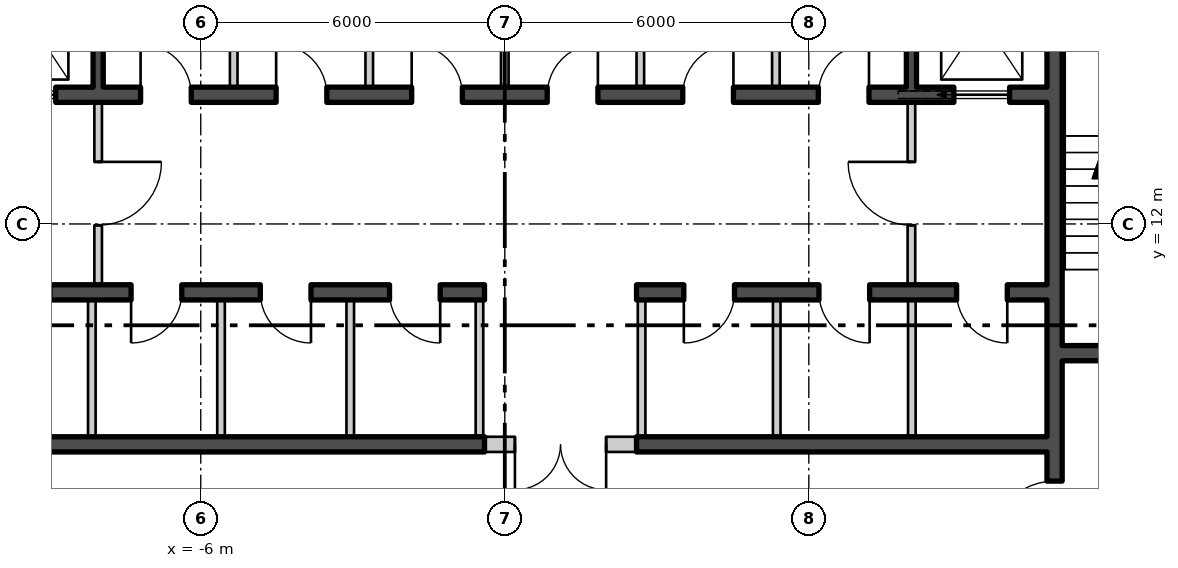
"""IFC4 building model, lengths in metres.
Left out: names, types, materials, properties, quantities, classifications, styles, units other than length and angle.
Written with IfcOpenShell. Run it as: python <this file> out.ifc"""

import sys

from ifc_helpers import new_model, si_unit, direction, frame, frame_2d, origin, place, context, subcontext, project, spatial, rectangle, extrude, element, fill, save


model = new_model("IFC4")
c1 = context("Model", 3, precision=1e-05, world=origin(), true_north=direction((0.0, 1.0)))
c2 = subcontext(c1, "Body", "Model", "MODEL_VIEW")
j1 = project(units=[si_unit("LENGTHUNIT", "METRE"), si_unit("PLANEANGLEUNIT", "RADIAN")], contexts=[c1])
p1 = place(None, origin())
s1 = spatial("IfcSite", under=j1, at=p1, CompositionType="ELEMENT")
p2 = place(p1, origin())
s2 = spatial("IfcBuilding", under=s1, at=p2, CompositionType="ELEMENT")
p3 = place(p2, frame((0.0, 0.0, -16.8)))
s3 = spatial("IfcBuildingStorey", under=s2, at=p3, CompositionType="ELEMENT", Elevation=-16.8)
p4 = place(p3, frame((10.85, 0.6, 0.0), z_axis=(0.0, 0.0, 1.0), x_axis=(0.0, 1.0, 0.0)))
e1 = element("IfcWall", 1, at=p4, inside=s3, PredefinedType="SHEAR", context=c2, shape_type="SweptSolid", body=[
    extrude(rectangle(XDim=16.8, YDim=0.3, at=frame_2d((8.4, 0.0))), origin(), (0.0, 0.0, 1.0), 4.95),
])
p5 = place(p4, frame((5.075, 0.0, 0.0)))
e2 = element("IfcOpeningElement", 2, at=p5, cuts=e1, PredefinedType="OPENING", context=c2, shape_type="SweptSolid", body=[
    extrude(rectangle(XDim=1.25, YDim=2.1, at=frame_2d((0.625, 1.05))), frame((0.0, 0.16, 0.0), z_axis=(0.0, -1.0, 0.0), x_axis=(1.0, 0.0, 0.0)), (0.0, 0.0, 1.0), 0.32),
])
p6 = place(p4, frame((1.525, 0.0, 0.0)))
e3 = element("IfcOpeningElement", 3, at=p6, cuts=e1, PredefinedType="OPENING", context=c2, shape_type="SweptSolid", body=[
    extrude(rectangle(XDim=1.0, YDim=2.1, at=frame_2d((0.5, 1.05))), frame((0.0, 0.16, 0.0), z_axis=(0.0, -1.0, 0.0), x_axis=(1.0, 0.0, 0.0)), (0.0, 0.0, 1.0), 0.32),
])
p7 = place(p3, frame((11.0, 9.45, 0.0), z_axis=(0.0, 0.0, 1.0), x_axis=(1.0, 0.0, 0.0)))
e4 = element("IfcWall", 4, at=p7, inside=s3, PredefinedType="SHEAR", context=c2, shape_type="SweptSolid", body=[
    extrude(rectangle(XDim=3.2, YDim=0.3, at=frame_2d((1.6, 0.0))), origin(), (0.0, 0.0, 1.0), 4.95),
])
p8 = place(p7, frame((1.0, 0.0, 0.0)))
e5 = element("IfcOpeningElement", 5, at=p8, cuts=e4, PredefinedType="OPENING", context=c2, shape_type="SweptSolid", body=[
    extrude(rectangle(XDim=1.2, YDim=2.1, at=frame_2d((0.6, 1.05))), frame((0.0, 0.16, 0.0), z_axis=(0.0, -1.0, 0.0), x_axis=(1.0, 0.0, 0.0)), (0.0, 0.0, 1.0), 0.32),
])
p9 = place(p3, frame((-10.7, 14.55, 0.0), z_axis=(0.0, 0.0, 1.0), x_axis=(1.0, 0.0, 0.0)))
e6 = element("IfcWall", 6, at=p9, inside=s3, PredefinedType="SHEAR", context=c2, shape_type="SweptSolid", body=[
    extrude(rectangle(XDim=21.4, YDim=0.3, at=frame_2d((10.7, 0.0))), origin(), (0.0, 0.0, 1.0), 4.95),
])
p10 = place(p9, frame((0.738, 0.0, 0.0)))
e7 = element("IfcOpeningElement", 7, at=p10, cuts=e6, PredefinedType="OPENING", context=c2, shape_type="SweptSolid", body=[
    extrude(rectangle(XDim=1.1, YDim=2.1, at=frame_2d((0.55, 1.05))), frame((0.0, 0.16, 0.0), z_axis=(0.0, -1.0, 0.0), x_axis=(1.0, 0.0, 0.0)), (0.0, 0.0, 1.0), 0.32),
])
p11 = place(p9, frame((19.562, 0.0, 0.0)))
e8 = element("IfcOpeningElement", 8, at=p11, cuts=e6, PredefinedType="OPENING", context=c2, shape_type="SweptSolid", body=[
    extrude(rectangle(XDim=1.1, YDim=2.1, at=frame_2d((0.55, 1.05))), frame((0.0, 0.16, 0.0), z_axis=(0.0, -1.0, 0.0), x_axis=(1.0, 0.0, 0.0)), (0.0, 0.0, 1.0), 0.32),
])
p12 = place(p9, frame((3.513, 0.0, 0.0)))
e9 = element("IfcOpeningElement", 9, at=p12, cuts=e6, PredefinedType="OPENING", context=c2, shape_type="SweptSolid", body=[
    extrude(rectangle(XDim=1.0, YDim=2.1, at=frame_2d((0.5, 1.05))), frame((0.0, 0.16, 0.0), z_axis=(0.0, -1.0, 0.0), x_axis=(1.0, 0.0, 0.0)), (0.0, 0.0, 1.0), 0.32),
])
p13 = place(p9, frame((6.188, 0.0, 0.0)))
e10 = element("IfcOpeningElement", 10, at=p13, cuts=e6, PredefinedType="OPENING", context=c2, shape_type="SweptSolid", body=[
    extrude(rectangle(XDim=1.0, YDim=2.1, at=frame_2d((0.5, 1.05))), frame((0.0, 0.16, 0.0), z_axis=(0.0, -1.0, 0.0), x_axis=(1.0, 0.0, 0.0)), (0.0, 0.0, 1.0), 0.32),
])
p14 = place(p9, frame((8.863, 0.0, 0.0)))
e11 = element("IfcOpeningElement", 11, at=p14, cuts=e6, PredefinedType="OPENING", context=c2, shape_type="SweptSolid", body=[
    extrude(rectangle(XDim=1.0, YDim=2.1, at=frame_2d((0.5, 1.05))), frame((0.0, 0.16, 0.0), z_axis=(0.0, -1.0, 0.0), x_axis=(1.0, 0.0, 0.0)), (0.0, 0.0, 1.0), 0.32),
])
p15 = place(p9, frame((11.537, 0.0, 0.0)))
e12 = element("IfcOpeningElement", 12, at=p15, cuts=e6, PredefinedType="OPENING", context=c2, shape_type="SweptSolid", body=[
    extrude(rectangle(XDim=1.0, YDim=2.1, at=frame_2d((0.5, 1.05))), frame((0.0, 0.16, 0.0), z_axis=(0.0, -1.0, 0.0), x_axis=(1.0, 0.0, 0.0)), (0.0, 0.0, 1.0), 0.32),
])
p16 = place(p9, frame((14.213, 0.0, 0.0)))
e13 = element("IfcOpeningElement", 13, at=p16, cuts=e6, PredefinedType="OPENING", context=c2, shape_type="SweptSolid", body=[
    extrude(rectangle(XDim=1.0, YDim=2.1, at=frame_2d((0.5, 1.05))), frame((0.0, 0.16, 0.0), z_axis=(0.0, -1.0, 0.0), x_axis=(1.0, 0.0, 0.0)), (0.0, 0.0, 1.0), 0.32),
])
p17 = place(p9, frame((16.887, 0.0, 0.0)))
e14 = element("IfcOpeningElement", 14, at=p17, cuts=e6, PredefinedType="OPENING", context=c2, shape_type="SweptSolid", body=[
    extrude(rectangle(XDim=1.0, YDim=2.1, at=frame_2d((0.5, 1.05))), frame((0.0, 0.16, 0.0), z_axis=(0.0, -1.0, 0.0), x_axis=(1.0, 0.0, 0.0)), (0.0, 0.0, 1.0), 0.32),
])
p18 = place(p3, frame((-10.7, 10.65, 0.0), z_axis=(0.0, 0.0, 1.0), x_axis=(1.0, 0.0, 0.0)))
e15 = element("IfcWall", 15, at=p18, inside=s3, PredefinedType="SHEAR", context=c2, shape_type="SweptSolid", body=[
    extrude(rectangle(XDim=10.3, YDim=0.3, at=frame_2d((5.15, 0.0))), origin(), (0.0, 0.0, 1.0), 4.95),
])
p19 = place(p18, frame((0.725, 0.0, 0.0)))
e16 = element("IfcOpeningElement", 16, at=p19, cuts=e15, PredefinedType="OPENING", context=c2, shape_type="SweptSolid", body=[
    extrude(rectangle(XDim=1.0, YDim=2.1, at=frame_2d((0.5, 1.05))), frame((0.0, 0.16, 0.0), z_axis=(0.0, -1.0, 0.0), x_axis=(1.0, 0.0, 0.0)), (0.0, 0.0, 1.0), 0.32),
])
p20 = place(p18, frame((3.325, 0.0, 0.0)))
e17 = element("IfcOpeningElement", 17, at=p20, cuts=e15, PredefinedType="OPENING", context=c2, shape_type="SweptSolid", body=[
    extrude(rectangle(XDim=1.0, YDim=2.1, at=frame_2d((0.5, 1.05))), frame((0.0, 0.16, 0.0), z_axis=(0.0, -1.0, 0.0), x_axis=(1.0, 0.0, 0.0)), (0.0, 0.0, 1.0), 0.32),
])
p21 = place(p18, frame((5.875, 0.0, 0.0)))
e18 = element("IfcOpeningElement", 18, at=p21, cuts=e15, PredefinedType="OPENING", context=c2, shape_type="SweptSolid", body=[
    extrude(rectangle(XDim=1.0, YDim=2.1, at=frame_2d((0.5, 1.05))), frame((0.0, 0.16, 0.0), z_axis=(0.0, -1.0, 0.0), x_axis=(1.0, 0.0, 0.0)), (0.0, 0.0, 1.0), 0.32),
])
p22 = place(p18, frame((8.425, 0.0, 0.0)))
e19 = element("IfcOpeningElement", 19, at=p22, cuts=e15, PredefinedType="OPENING", context=c2, shape_type="SweptSolid", body=[
    extrude(rectangle(XDim=1.0, YDim=2.1, at=frame_2d((0.5, 1.05))), frame((0.0, 0.16, 0.0), z_axis=(0.0, -1.0, 0.0), x_axis=(1.0, 0.0, 0.0)), (0.0, 0.0, 1.0), 0.32),
])
p23 = place(p3, frame((-10.7, 7.65, 0.0), z_axis=(0.0, 0.0, 1.0), x_axis=(1.0, 0.0, 0.0)))
e20 = element("IfcWall", 20, at=p23, inside=s3, PredefinedType="SHEAR", context=c2, shape_type="SweptSolid", body=[
    extrude(rectangle(XDim=10.3, YDim=0.3, at=frame_2d((5.15, 0.0))), origin(), (0.0, 0.0, 1.0), 4.95),
])
p24 = place(p3, frame((2.6, 10.65, 0.0), z_axis=(0.0, 0.0, 1.0), x_axis=(1.0, 0.0, 0.0)))
e21 = element("IfcWall", 21, at=p24, inside=s3, PredefinedType="SHEAR", context=c2, shape_type="SweptSolid", body=[
    extrude(rectangle(XDim=8.1, YDim=0.3, at=frame_2d((4.05, 0.0))), origin(), (0.0, 0.0, 1.0), 4.95),
])
p25 = place(p24, frame((0.933, 0.0, 0.0)))
e22 = element("IfcOpeningElement", 22, at=p25, cuts=e21, PredefinedType="OPENING", context=c2, shape_type="SweptSolid", body=[
    extrude(rectangle(XDim=1.0, YDim=2.1, at=frame_2d((0.5, 1.05))), frame((0.0, 0.16, 0.0), z_axis=(0.0, -1.0, 0.0), x_axis=(1.0, 0.0, 0.0)), (0.0, 0.0, 1.0), 0.32),
])
p26 = place(p24, frame((3.6, 0.0, 0.0)))
e23 = element("IfcOpeningElement", 23, at=p26, cuts=e21, PredefinedType="OPENING", context=c2, shape_type="SweptSolid", body=[
    extrude(rectangle(XDim=1.0, YDim=2.1, at=frame_2d((0.5, 1.05))), frame((0.0, 0.16, 0.0), z_axis=(0.0, -1.0, 0.0), x_axis=(1.0, 0.0, 0.0)), (0.0, 0.0, 1.0), 0.32),
])
p27 = place(p24, frame((6.317, 0.0, 0.0)))
e24 = element("IfcOpeningElement", 24, at=p27, cuts=e21, PredefinedType="OPENING", context=c2, shape_type="SweptSolid", body=[
    extrude(rectangle(XDim=1.0, YDim=2.1, at=frame_2d((0.5, 1.05))), frame((0.0, 0.16, 0.0), z_axis=(0.0, -1.0, 0.0), x_axis=(1.0, 0.0, 0.0)), (0.0, 0.0, 1.0), 0.32),
])
p28 = place(p3, frame((2.6, 7.65, 0.0), z_axis=(0.0, 0.0, 1.0), x_axis=(1.0, 0.0, 0.0)))
e25 = element("IfcWall", 25, at=p28, inside=s3, PredefinedType="SHEAR", context=c2, shape_type="SweptSolid", body=[
    extrude(rectangle(XDim=8.1, YDim=0.3, at=frame_2d((4.05, 0.0))), origin(), (0.0, 0.0, 1.0), 4.95),
])
p29 = place(p3, frame((-8.025, 14.7, 0.0), z_axis=(0.0, 0.0, 1.0), x_axis=(0.0, 1.0, 0.0)))
e26 = element("IfcWall", 26, at=p29, inside=s3, PredefinedType="SHEAR", context=c2, shape_type="SweptSolid", body=[
    extrude(rectangle(XDim=2.7, YDim=0.2, at=frame_2d((1.35, 0.0))), origin(), (0.0, 0.0, 1.0), 4.95),
])
for number, where, z_axis, x_axis in (
    (27, (-5.35, 14.7, 0.0), (0.0, 0.0, 1.0), (0.0, 1.0, 0.0)),
    (28, (-2.675, 14.7, 0.0), (0.0, 0.0, 1.0), (0.0, 1.0, 0.0)),
    (29, (0.0, 14.7, 0.0), (0.0, 0.0, 1.0), (0.0, 1.0, 0.0)),
    (30, (2.675, 14.7, 0.0), (0.0, 0.0, 1.0), (0.0, 1.0, 0.0)),
    (31, (5.35, 14.7, 0.0), (0.0, 0.0, 1.0), (0.0, 1.0, 0.0)),
):
    element("IfcWall", number, at=place(p3, frame(where, z_axis=z_axis, x_axis=x_axis)), inside=s3, PredefinedType="PARTITIONING", context=c2, shape_type="SweptSolid", body=[
        extrude(rectangle(XDim=2.7, YDim=0.15, at=frame_2d((1.35, 0.0))), origin(), (0.0, 0.0, 1.0), 4.95),
    ])
p30 = place(p3, frame((8.025, 14.7, 0.0), z_axis=(0.0, 0.0, 1.0), x_axis=(0.0, 1.0, 0.0)))
e32 = element("IfcWall", 32, at=p30, inside=s3, PredefinedType="SHEAR", context=c2, shape_type="SweptSolid", body=[
    extrude(rectangle(XDim=2.7, YDim=0.2, at=frame_2d((1.35, 0.0))), origin(), (0.0, 0.0, 1.0), 4.95),
])
for number, where, z_axis, x_axis in (
    (33, (-8.15, 7.8, 0.0), (0.0, 0.0, 1.0), (0.0, 1.0, 0.0)),
    (34, (-5.6, 7.8, 0.0), (0.0, 0.0, 1.0), (0.0, 1.0, 0.0)),
    (35, (-3.05, 7.8, 0.0), (0.0, 0.0, 1.0), (0.0, 1.0, 0.0)),
    (36, (-0.5, 7.8, 0.0), (0.0, 0.0, 1.0), (0.0, 1.0, 0.0)),
    (37, (2.7, 7.8, 0.0), (0.0, 0.0, 1.0), (0.0, 1.0, 0.0)),
    (38, (5.367, 7.8, 0.0), (0.0, 0.0, 1.0), (0.0, 1.0, 0.0)),
    (39, (8.033, 7.8, 0.0), (0.0, 0.0, 1.0), (0.0, 1.0, 0.0)),
):
    element("IfcWall", number, at=place(p3, frame(where, z_axis=z_axis, x_axis=x_axis)), inside=s3, PredefinedType="PARTITIONING", context=c2, shape_type="SweptSolid", body=[
        extrude(rectangle(XDim=2.7, YDim=0.15, at=frame_2d((1.35, 0.0))), origin(), (0.0, 0.0, 1.0), 4.95),
    ])
p31 = place(p3, frame((-8.025, 10.8, 0.0), z_axis=(0.0, 0.0, 1.0), x_axis=(0.0, 1.0, 0.0)))
e40 = element("IfcWall", 40, at=p31, inside=s3, PredefinedType="PARTITIONING", context=c2, shape_type="SweptSolid", body=[
    extrude(rectangle(XDim=3.6, YDim=0.15, at=frame_2d((1.8, 0.0))), origin(), (0.0, 0.0, 1.0), 4.95),
])
p32 = place(p31, frame((1.175, 0.0, 0.0)))
e41 = element("IfcOpeningElement", 41, at=p32, cuts=e40, PredefinedType="OPENING", context=c2, shape_type="SweptSolid", body=[
    extrude(rectangle(XDim=1.25, YDim=2.1, at=frame_2d((0.625, 1.05))), frame((0.0, 0.085, 0.0), z_axis=(0.0, -1.0, 0.0), x_axis=(1.0, 0.0, 0.0)), (0.0, 0.0, 1.0), 0.17),
])
p33 = place(p3, frame((8.025, 10.8, 0.0), z_axis=(0.0, 0.0, 1.0), x_axis=(0.0, 1.0, 0.0)))
e42 = element("IfcWall", 42, at=p33, inside=s3, PredefinedType="PARTITIONING", context=c2, shape_type="SweptSolid", body=[
    extrude(rectangle(XDim=3.6, YDim=0.15, at=frame_2d((1.8, 0.0))), origin(), (0.0, 0.0, 1.0), 4.95),
])
p34 = place(p33, frame((1.175, 0.0, 0.0)))
e43 = element("IfcOpeningElement", 43, at=p34, cuts=e42, PredefinedType="OPENING", context=c2, shape_type="SweptSolid", body=[
    extrude(rectangle(XDim=1.25, YDim=2.1, at=frame_2d((0.625, 1.05))), frame((0.0, 0.085, 0.0), z_axis=(0.0, -1.0, 0.0), x_axis=(1.0, 0.0, 0.0)), (0.0, 0.0, 1.0), 0.17),
])
p35 = place(p3, frame((-0.4, 7.65, 0.0), z_axis=(0.0, 0.0, 1.0), x_axis=(1.0, 0.0, 0.0)))
e44 = element("IfcWall", 44, at=p35, inside=s3, PredefinedType="PARTITIONING", context=c2, shape_type="SweptSolid", body=[
    extrude(rectangle(XDim=3.0, YDim=0.3, at=frame_2d((1.5, 0.0))), origin(), (0.0, 0.0, 1.0), 4.95),
])
p36 = place(p35, frame((0.6, 0.0, 0.0)))
e45 = element("IfcOpeningElement", 45, at=p36, cuts=e44, PredefinedType="OPENING", context=c2, shape_type="SweptSolid", body=[
    extrude(rectangle(XDim=1.8, YDim=2.4, at=frame_2d((0.9, 1.2))), frame((0.0, 0.16, 0.0), z_axis=(0.0, -1.0, 0.0), x_axis=(1.0, 0.0, 0.0)), (0.0, 0.0, 1.0), 0.32),
])
p37 = place(p10, origin())
e46 = element("IfcDoor", 46, at=p37, inside=s3, OperationType="SLIDING_TO_LEFT", PredefinedType="DOOR", context=c2, shape_type="SweptSolid", body=[
    extrude(rectangle(XDim=1.1, YDim=2.1, at=frame_2d((0.55, 1.05))), frame((0.0, 0.025, 0.0), z_axis=(0.0, -1.0, 0.0), x_axis=(1.0, 0.0, 0.0)), (0.0, 0.0, 1.0), 0.05),
])
fill(e7, e46)
p38 = place(p11, origin())
e47 = element("IfcDoor", 47, at=p38, inside=s3, OperationType="SLIDING_TO_LEFT", PredefinedType="DOOR", context=c2, shape_type="SweptSolid", body=[
    extrude(rectangle(XDim=1.1, YDim=2.1, at=frame_2d((0.55, 1.05))), frame((0.0, 0.025, 0.0), z_axis=(0.0, -1.0, 0.0), x_axis=(1.0, 0.0, 0.0)), (0.0, 0.0, 1.0), 0.05),
])
fill(e8, e47)
p39 = place(p12, origin())
e48 = element("IfcDoor", 48, at=p39, inside=s3, OperationType="SINGLE_SWING_RIGHT", PredefinedType="DOOR", context=c2, shape_type="SweptSolid", body=[
    extrude(rectangle(XDim=1.0, YDim=2.1, at=frame_2d((0.5, 1.05))), frame((0.0, 0.025, 0.0), z_axis=(0.0, -1.0, 0.0), x_axis=(1.0, 0.0, 0.0)), (0.0, 0.0, 1.0), 0.05),
])
fill(e9, e48)
p40 = place(p13, origin())
e49 = element("IfcDoor", 49, at=p40, inside=s3, OperationType="SINGLE_SWING_RIGHT", PredefinedType="DOOR", context=c2, shape_type="SweptSolid", body=[
    extrude(rectangle(XDim=1.0, YDim=2.1, at=frame_2d((0.5, 1.05))), frame((0.0, 0.025, 0.0), z_axis=(0.0, -1.0, 0.0), x_axis=(1.0, 0.0, 0.0)), (0.0, 0.0, 1.0), 0.05),
])
fill(e10, e49)
p41 = place(p14, origin())
e50 = element("IfcDoor", 50, at=p41, inside=s3, OperationType="SINGLE_SWING_RIGHT", PredefinedType="DOOR", context=c2, shape_type="SweptSolid", body=[
    extrude(rectangle(XDim=1.0, YDim=2.1, at=frame_2d((0.5, 1.05))), frame((0.0, 0.025, 0.0), z_axis=(0.0, -1.0, 0.0), x_axis=(1.0, 0.0, 0.0)), (0.0, 0.0, 1.0), 0.05),
])
fill(e11, e50)
p42 = place(p15, origin())
e51 = element("IfcDoor", 51, at=p42, inside=s3, OperationType="SINGLE_SWING_LEFT", PredefinedType="DOOR", context=c2, shape_type="SweptSolid", body=[
    extrude(rectangle(XDim=1.0, YDim=2.1, at=frame_2d((0.5, 1.05))), frame((0.0, 0.025, 0.0), z_axis=(0.0, -1.0, 0.0), x_axis=(1.0, 0.0, 0.0)), (0.0, 0.0, 1.0), 0.05),
])
fill(e12, e51)
p43 = place(p16, origin())
e52 = element("IfcDoor", 52, at=p43, inside=s3, OperationType="SINGLE_SWING_LEFT", PredefinedType="DOOR", context=c2, shape_type="SweptSolid", body=[
    extrude(rectangle(XDim=1.0, YDim=2.1, at=frame_2d((0.5, 1.05))), frame((0.0, 0.025, 0.0), z_axis=(0.0, -1.0, 0.0), x_axis=(1.0, 0.0, 0.0)), (0.0, 0.0, 1.0), 0.05),
])
fill(e13, e52)
p44 = place(p17, origin())
e53 = element("IfcDoor", 53, at=p44, inside=s3, OperationType="SINGLE_SWING_LEFT", PredefinedType="DOOR", context=c2, shape_type="SweptSolid", body=[
    extrude(rectangle(XDim=1.0, YDim=2.1, at=frame_2d((0.5, 1.05))), frame((0.0, 0.025, 0.0), z_axis=(0.0, -1.0, 0.0), x_axis=(1.0, 0.0, 0.0)), (0.0, 0.0, 1.0), 0.05),
])
fill(e14, e53)
p45 = place(p20, origin())
e54 = element("IfcDoor", 54, at=p45, inside=s3, OperationType="SINGLE_SWING_LEFT", PredefinedType="DOOR", context=c2, shape_type="SweptSolid", body=[
    extrude(rectangle(XDim=1.0, YDim=2.1, at=frame_2d((0.5, 1.05))), frame((0.0, 0.025, 0.0), z_axis=(0.0, -1.0, 0.0), x_axis=(1.0, 0.0, 0.0)), (0.0, 0.0, 1.0), 0.05),
])
fill(e17, e54)
p46 = place(p21, origin())
e55 = element("IfcDoor", 55, at=p46, inside=s3, OperationType="SINGLE_SWING_RIGHT", PredefinedType="DOOR", context=c2, shape_type="SweptSolid", body=[
    extrude(rectangle(XDim=1.0, YDim=2.1, at=frame_2d((0.5, 1.05))), frame((0.0, 0.025, 0.0), z_axis=(0.0, -1.0, 0.0), x_axis=(1.0, 0.0, 0.0)), (0.0, 0.0, 1.0), 0.05),
])
fill(e18, e55)
p47 = place(p22, origin())
e56 = element("IfcDoor", 56, at=p47, inside=s3, OperationType="SINGLE_SWING_RIGHT", PredefinedType="DOOR", context=c2, shape_type="SweptSolid", body=[
    extrude(rectangle(XDim=1.0, YDim=2.1, at=frame_2d((0.5, 1.05))), frame((0.0, 0.025, 0.0), z_axis=(0.0, -1.0, 0.0), x_axis=(1.0, 0.0, 0.0)), (0.0, 0.0, 1.0), 0.05),
])
fill(e19, e56)
p48 = place(p25, origin())
e57 = element("IfcDoor", 57, at=p48, inside=s3, OperationType="SINGLE_SWING_LEFT", PredefinedType="DOOR", context=c2, shape_type="SweptSolid", body=[
    extrude(rectangle(XDim=1.0, YDim=2.1, at=frame_2d((0.5, 1.05))), frame((0.0, 0.025, 0.0), z_axis=(0.0, -1.0, 0.0), x_axis=(1.0, 0.0, 0.0)), (0.0, 0.0, 1.0), 0.05),
])
fill(e22, e57)
p49 = place(p26, origin())
e58 = element("IfcDoor", 58, at=p49, inside=s3, OperationType="SINGLE_SWING_RIGHT", PredefinedType="DOOR", context=c2, shape_type="SweptSolid", body=[
    extrude(rectangle(XDim=1.0, YDim=2.1, at=frame_2d((0.5, 1.05))), frame((0.0, 0.025, 0.0), z_axis=(0.0, -1.0, 0.0), x_axis=(1.0, 0.0, 0.0)), (0.0, 0.0, 1.0), 0.05),
])
fill(e23, e58)
p50 = place(p27, origin())
e59 = element("IfcDoor", 59, at=p50, inside=s3, OperationType="SINGLE_SWING_RIGHT", PredefinedType="DOOR", context=c2, shape_type="SweptSolid", body=[
    extrude(rectangle(XDim=1.0, YDim=2.1, at=frame_2d((0.5, 1.05))), frame((0.0, 0.025, 0.0), z_axis=(0.0, -1.0, 0.0), x_axis=(1.0, 0.0, 0.0)), (0.0, 0.0, 1.0), 0.05),
])
fill(e24, e59)
p51 = place(p32, origin())
e60 = element("IfcDoor", 60, at=p51, inside=s3, OperationType="SINGLE_SWING_RIGHT", PredefinedType="DOOR", context=c2, shape_type="SweptSolid", body=[
    extrude(rectangle(XDim=1.25, YDim=2.1, at=frame_2d((0.625, 1.05))), frame((0.0, 0.025, 0.0), z_axis=(0.0, -1.0, 0.0), x_axis=(1.0, 0.0, 0.0)), (0.0, 0.0, 1.0), 0.05),
])
fill(e41, e60)
p52 = place(p34, origin())
e61 = element("IfcDoor", 61, at=p52, inside=s3, OperationType="SINGLE_SWING_LEFT", PredefinedType="DOOR", context=c2, shape_type="SweptSolid", body=[
    extrude(rectangle(XDim=1.25, YDim=2.1, at=frame_2d((0.625, 1.05))), frame((0.0, 0.025, 0.0), z_axis=(0.0, -1.0, 0.0), x_axis=(1.0, 0.0, 0.0)), (0.0, 0.0, 1.0), 0.05),
])
fill(e43, e61)
p53 = place(p5, origin())
e62 = element("IfcDoor", 62, at=p53, inside=s3, OperationType="SINGLE_SWING_RIGHT", PredefinedType="DOOR", context=c2, shape_type="SweptSolid", body=[
    extrude(rectangle(XDim=1.25, YDim=2.1, at=frame_2d((0.625, 1.05))), frame((0.0, 0.025, 0.0), z_axis=(0.0, -1.0, 0.0), x_axis=(1.0, 0.0, 0.0)), (0.0, 0.0, 1.0), 0.05),
])
fill(e2, e62)
p54 = place(p36, origin())
e63 = element("IfcDoor", 63, at=p54, inside=s3, OperationType="DOUBLE_DOOR_SINGLE_SWING", PredefinedType="DOOR", context=c2, shape_type="SweptSolid", body=[
    extrude(rectangle(XDim=1.8, YDim=2.4, at=frame_2d((0.9, 1.2))), frame((0.0, 0.025, 0.0), z_axis=(0.0, -1.0, 0.0), x_axis=(1.0, 0.0, 0.0)), (0.0, 0.0, 1.0), 0.05),
])
fill(e45, e63)
save(model, sys.argv[1])
